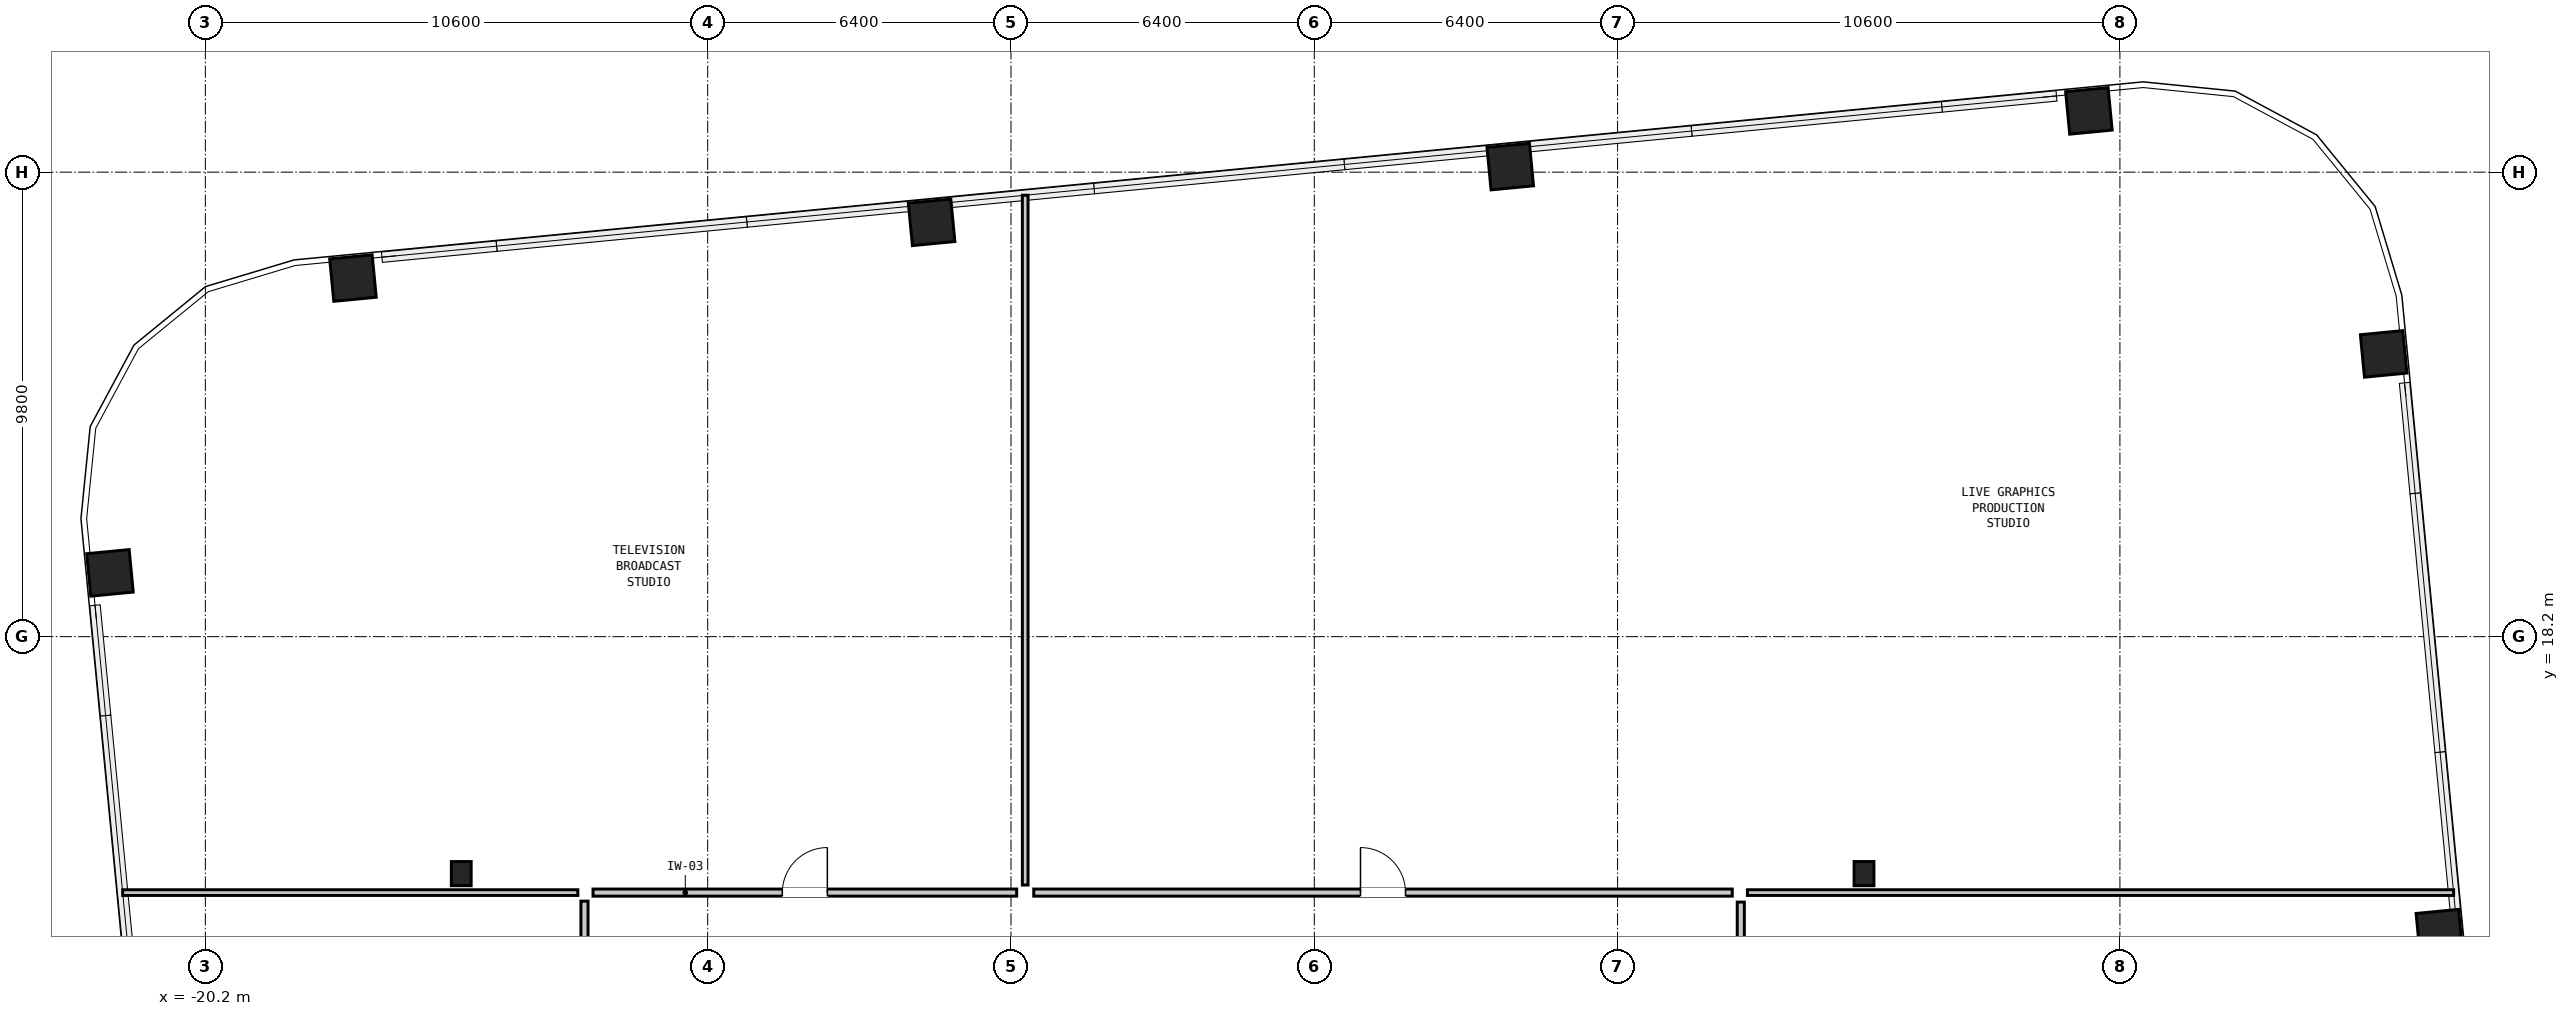
"""IFC4 building model, lengths in metres.
Left out: names, types, materials, properties, quantities, classifications, styles, units other than length and angle.
Written with IfcOpenShell. Run it as: python <this file> out.ifc"""

import sys

from ifc_helpers import new_model, si_unit, direction, frame, frame_2d, origin, origin_2d, place, context, subcontext, project, spatial, rectangle, hollow_rectangle, i_section, extrude, element, fill, save


model = new_model("IFC4")
c1 = context("Model", 3, precision=1e-05, world=origin(), true_north=direction((0.0, 1.0)))
c2 = subcontext(c1, "Body", "Model", "MODEL_VIEW")
j1 = project(units=[si_unit("LENGTHUNIT", "METRE"), si_unit("PLANEANGLEUNIT", "RADIAN")], contexts=[c1])
p1 = place(None, origin())
s1 = spatial("IfcSite", under=j1, at=p1, CompositionType="ELEMENT")
p2 = place(p1, origin())
s2 = spatial("IfcBuilding", under=s1, at=p2, CompositionType="ELEMENT")
p3 = place(p2, frame((0.0, 0.0, 72.5)))
s3 = spatial("IfcBuildingStorey", under=s2, at=p3, CompositionType="ELEMENT", Elevation=72.5)
for number, where, z_axis, x_axis in (
    (1, (26.941, 11.955, 0.0), (0.0, 0.0, 1.0), (-0.096, 0.995, 0.0)),
    (2, (25.765, 24.165, 0.0), (0.0, 0.0, 1.0), (-0.096, 0.995, 0.0)),
    (3, (19.545, 29.292, 0.0), (0.0, 0.0, 1.0), (0.995, 0.096, 0.0)),
    (4, (7.335, 28.117, 0.0), (0.0, 0.0, 1.0), (0.995, 0.096, 0.0)),
    (5, (-4.875, 26.941, 0.0), (0.0, 0.0, 1.0), (0.995, 0.096, 0.0)),
    (6, (-17.085, 25.765, 0.0), (0.0, 0.0, 1.0), (0.995, 0.096, 0.0)),
    (7, (-22.213, 19.545, 0.0), (0.0, 0.0, 1.0), (-0.096, 0.995, 0.0)),
):
    element("IfcColumn", number, at=place(p3, frame(where, z_axis=z_axis, x_axis=x_axis)), inside=s3, PredefinedType="COLUMN", context=c2, shape_type="SweptSolid", body=[
        extrude(hollow_rectangle(XDim=0.9, YDim=0.9, WallThickness=0.055, at=origin_2d()), origin(), (0.0, 0.0, 1.0), 3.05),
    ])
for number, where, z_axis, x_axis in (
    (8, (-14.8, 13.2, 0.0), (0.0, 0.0, 1.0), (1.0, 0.0, 0.0)),
    (9, (14.8, 13.2, 0.0), (0.0, 0.0, 1.0), (1.0, 0.0, 0.0)),
):
    element("IfcColumn", number, at=place(p3, frame(where, z_axis=z_axis, x_axis=x_axis)), inside=s3, PredefinedType="COLUMN", context=c2, shape_type="SweptSolid", body=[
        extrude(i_section(OverallWidth=0.418, OverallDepth=0.51, WebThickness=0.042, FlangeThickness=0.068, at=origin_2d()), origin(), (0.0, 0.0, 1.0), 3.05),
    ])
p4 = place(p3, frame((-21.945, 12.8, 0.0), z_axis=(0.0, 0.0, 1.0), x_axis=(1.0, 0.0, 0.0)))
e10 = element("IfcWall", 10, at=p4, inside=s3, PredefinedType="PARTITIONING", context=c2, shape_type="SweptSolid", body=[
    extrude(rectangle(XDim=9.605, YDim=0.12, at=frame_2d((4.802, 0.0))), origin(), (0.0, 0.0, 1.0), 2.83),
])
p5 = place(p3, frame((12.34, 12.8, 0.0), z_axis=(0.0, 0.0, 1.0), x_axis=(1.0, 0.0, 0.0)))
e11 = element("IfcWall", 11, at=p5, inside=s3, PredefinedType="PARTITIONING", context=c2, shape_type="SweptSolid", body=[
    extrude(rectangle(XDim=14.902, YDim=0.12, at=frame_2d((7.451, 0.0))), origin(), (0.0, 0.0, 1.0), 2.83),
])
p6 = place(p3, frame((-2.9, 12.96, 0.0), z_axis=(0.0, 0.0, 1.0), x_axis=(0.0, 1.0, 0.0)))
e12 = element("IfcWall", 12, at=p6, inside=s3, PredefinedType="PARTITIONING", context=c2, shape_type="SweptSolid", body=[
    extrude(rectangle(XDim=14.553, YDim=0.12, at=frame_2d((7.277, 0.0))), origin(), (0.0, 0.0, 1.0), 2.274),
])
p7 = place(p3, frame((-12.02, 12.8, 0.0), z_axis=(0.0, 0.0, 1.0), x_axis=(1.0, 0.0, 0.0)))
e13 = element("IfcWall", 13, at=p7, inside=s3, PredefinedType="PARTITIONING", context=c2, shape_type="SweptSolid", body=[
    extrude(rectangle(XDim=8.94, YDim=0.15, at=frame_2d((4.47, 0.0))), origin(), (0.0, 0.0, 1.0), 2.83),
])
p8 = place(p7, frame((3.995, 0.0, 0.0)))
e14 = element("IfcOpeningElement", 14, at=p8, cuts=e13, PredefinedType="OPENING", context=c2, shape_type="SweptSolid", body=[
    extrude(rectangle(XDim=0.95, YDim=2.1, at=frame_2d((0.475, 1.05))), frame((0.0, 0.087, 0.0), z_axis=(0.0, -1.0, 0.0), x_axis=(1.0, 0.0, 0.0)), (0.0, 0.0, 1.0), 0.174),
])
p9 = place(p3, frame((-2.72, 12.8, 0.0), z_axis=(0.0, 0.0, 1.0), x_axis=(1.0, 0.0, 0.0)))
e15 = element("IfcWall", 15, at=p9, inside=s3, PredefinedType="PARTITIONING", context=c2, shape_type="SweptSolid", body=[
    extrude(rectangle(XDim=14.74, YDim=0.15, at=frame_2d((7.37, 0.0))), origin(), (0.0, 0.0, 1.0), 2.83),
])
p10 = place(p9, frame((6.895, 0.0, 0.0)))
e16 = element("IfcOpeningElement", 16, at=p10, cuts=e15, PredefinedType="OPENING", context=c2, shape_type="SweptSolid", body=[
    extrude(rectangle(XDim=0.95, YDim=2.1, at=frame_2d((0.475, 1.05))), frame((0.0, 0.087, 0.0), z_axis=(0.0, -1.0, 0.0), x_axis=(1.0, 0.0, 0.0)), (0.0, 0.0, 1.0), 0.174),
])
p11 = place(p3, frame((-12.2, -11.42, 0.0), z_axis=(0.0, 0.0, 1.0), x_axis=(0.0, 1.0, 0.0)))
e17 = element("IfcWall", 17, at=p11, inside=s3, PredefinedType="PARTITIONING", context=c2, shape_type="SweptSolid", body=[
    extrude(rectangle(XDim=24.04, YDim=0.15, at=frame_2d((12.02, 0.0))), origin(), (0.0, 0.0, 1.0), 2.83),
])
p12 = place(p11, frame((11.545, 0.0, 0.0)))
e18 = element("IfcOpeningElement", 18, at=p12, cuts=e17, PredefinedType="OPENING", context=c2, shape_type="SweptSolid", body=[
    extrude(rectangle(XDim=0.95, YDim=2.1, at=frame_2d((0.475, 1.05))), frame((0.0, 0.087, 0.0), z_axis=(0.0, -1.0, 0.0), x_axis=(1.0, 0.0, 0.0)), (0.0, 0.0, 1.0), 0.174),
])
p13 = place(p3, frame((12.2, 3.8, 0.0), z_axis=(0.0, 0.0, 1.0), x_axis=(0.0, 1.0, 0.0)))
e19 = element("IfcWall", 19, at=p13, inside=s3, PredefinedType="PARTITIONING", context=c2, shape_type="SweptSolid", body=[
    extrude(rectangle(XDim=8.8, YDim=0.15, at=frame_2d((4.4, 0.0))), origin(), (0.0, 0.0, 1.0), 2.83),
])
p14 = place(p13, frame((3.925, 0.0, 0.0)))
e20 = element("IfcOpeningElement", 20, at=p14, cuts=e19, PredefinedType="OPENING", context=c2, shape_type="SweptSolid", body=[
    extrude(rectangle(XDim=0.95, YDim=2.1, at=frame_2d((0.475, 1.05))), frame((0.0, 0.087, 0.0), z_axis=(0.0, -1.0, 0.0), x_axis=(1.0, 0.0, 0.0)), (0.0, 0.0, 1.0), 0.174),
])
p15 = place(p8, origin())
e21 = element("IfcDoor", 21, at=p15, inside=s3, OperationType="SINGLE_SWING_RIGHT", PredefinedType="DOOR", context=c2, shape_type="SweptSolid", body=[
    extrude(rectangle(XDim=0.95, YDim=2.1, at=frame_2d((0.475, 1.05))), frame((0.0, 0.025, 0.0), z_axis=(0.0, -1.0, 0.0), x_axis=(1.0, 0.0, 0.0)), (0.0, 0.0, 1.0), 0.05),
])
fill(e14, e21)
p16 = place(p10, origin())
e22 = element("IfcDoor", 22, at=p16, inside=s3, OperationType="SINGLE_SWING_LEFT", PredefinedType="DOOR", context=c2, shape_type="SweptSolid", body=[
    extrude(rectangle(XDim=0.95, YDim=2.1, at=frame_2d((0.475, 1.05))), frame((0.0, 0.025, 0.0), z_axis=(0.0, -1.0, 0.0), x_axis=(1.0, 0.0, 0.0)), (0.0, 0.0, 1.0), 0.05),
])
fill(e16, e22)
save(model, sys.argv[1])
